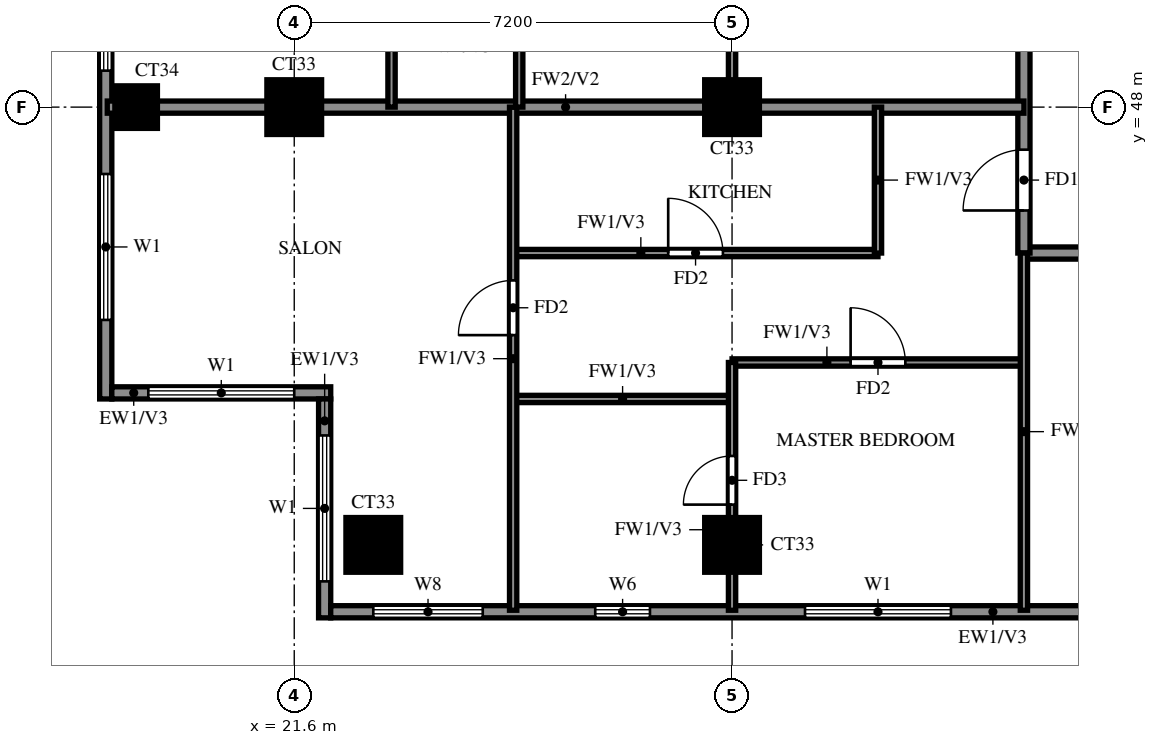
"""IFC4 building model, lengths in metres.
Left out: names, types, materials, properties, quantities, classifications, styles, units other than length and angle.
Written with IfcOpenShell. Run it as: python <this file> out.ifc"""

import sys

from ifc_helpers import new_model, si_unit, direction, frame, frame_2d, origin, origin_2d, place, context, subcontext, project, spatial, rectangle, extrude, source, transform, mapped, element, fill, save


model = new_model("IFC4")
c1 = context("Model", 3, precision=1e-05, world=origin(), true_north=direction((0.0, 1.0)))
c2 = subcontext(c1, "Body", "Model", "MODEL_VIEW")
j1 = project(units=[si_unit("LENGTHUNIT", "METRE"), si_unit("PLANEANGLEUNIT", "RADIAN")], contexts=[c1])
p1 = place(None, origin())
s1 = spatial("IfcSite", under=j1, at=p1, CompositionType="ELEMENT")
p2 = place(p1, origin())
s2 = spatial("IfcBuilding", under=s1, at=p2, CompositionType="ELEMENT")
p3 = place(p2, frame((0.0, 0.0, 215.0)))
s3 = spatial("IfcBuildingStorey", under=s2, at=p3, CompositionType="ELEMENT", Elevation=215.0)
m1 = source(origin(), c2, "Body", "SweptSolid", [
    extrude(rectangle(XDim=0.9, YDim=0.9, at=origin_2d()), origin(), (0.0, 0.0, 1.0), 3.22),
])
for number, where, z_axis, x_axis in (
    (1, (22.9, 40.8, 0.0), (0.0, 0.0, 1.0), (1.0, 0.0, 0.0)),
    (2, (28.8, 40.8, 0.0), (0.0, 0.0, 1.0), (1.0, 0.0, 0.0)),
):
    element("IfcColumn", number, at=place(p3, frame(where, z_axis=z_axis, x_axis=x_axis)), inside=s3, PredefinedType="COLUMN", context=c2, shape_type="MappedRepresentation", body=[
        mapped(m1, transform((0.0, 0.0, 0.0))),
    ])
m2 = source(origin(), c2, "Body", "SweptSolid", [
    extrude(rectangle(XDim=0.7, YDim=0.7, at=origin_2d()), origin(), (0.0, 0.0, 1.0), 3.22),
])
p4 = place(p3, frame((19.0, 48.0, 0.0), z_axis=(0.0, 0.0, 1.0), x_axis=(1.0, 0.0, 0.0)))
e3 = element("IfcColumn", 3, at=p4, inside=s3, PredefinedType="COLUMN", context=c2, shape_type="MappedRepresentation", body=[
    mapped(m2, transform((0.0, 0.0, 0.0))),
])
for number, where, z_axis, x_axis in (
    (4, (21.6, 48.0, 0.0), (0.0, 0.0, 1.0), (1.0, 0.0, 0.0)),
    (5, (28.8, 48.0, 0.0), (0.0, 0.0, 1.0), (1.0, 0.0, 0.0)),
):
    element("IfcColumn", number, at=place(p3, frame(where, z_axis=z_axis, x_axis=x_axis)), inside=s3, PredefinedType="COLUMN", context=c2, shape_type="MappedRepresentation", body=[
        mapped(m1, transform((0.0, 0.0, 0.0))),
    ])
p5 = place(p3, frame((18.5, 76.6, 0.0), z_axis=(0.0, 0.0, 1.0), x_axis=(0.0, -1.0, 0.0)))
e6 = element("IfcWall", 6, at=p5, inside=s3, PredefinedType="SOLIDWALL", context=c2, shape_type="SweptSolid", body=[
    extrude(rectangle(XDim=33.4, YDim=0.2, at=frame_2d((16.7, 0.0))), origin(), (0.0, 0.0, 1.0), 3.22),
])
p6 = place(p5, frame((29.7, 0.0, 0.6)))
e7 = element("IfcOpeningElement", 7, at=p6, cuts=e6, PredefinedType="OPENING", context=c2, shape_type="SweptSolid", body=[
    extrude(rectangle(XDim=2.4, YDim=2.4, at=frame_2d((1.2, 1.2))), frame((0.0, 0.11, 0.0), z_axis=(0.0, -1.0, 0.0), x_axis=(1.0, 0.0, 0.0)), (0.0, 0.0, 1.0), 0.22),
])
p7 = place(p5, frame((25.6, 0.0, 0.6)))
e8 = element("IfcOpeningElement", 8, at=p7, cuts=e6, PredefinedType="OPENING", context=c2, shape_type="SweptSolid", body=[
    extrude(rectangle(XDim=2.4, YDim=2.4, at=frame_2d((1.2, 1.2))), frame((0.0, 0.11, 0.0), z_axis=(0.0, -1.0, 0.0), x_axis=(1.0, 0.0, 0.0)), (0.0, 0.0, 1.0), 0.22),
])
p8 = place(p5, frame((22.0, 0.0, 0.6)))
e9 = element("IfcOpeningElement", 9, at=p8, cuts=e6, PredefinedType="OPENING", context=c2, shape_type="SweptSolid", body=[
    extrude(rectangle(XDim=2.4, YDim=2.4, at=frame_2d((1.2, 1.2))), frame((0.0, 0.11, 0.0), z_axis=(0.0, -1.0, 0.0), x_axis=(1.0, 0.0, 0.0)), (0.0, 0.0, 1.0), 0.22),
])
p9 = place(p5, frame((18.4, 0.0, 0.6)))
e10 = element("IfcOpeningElement", 10, at=p9, cuts=e6, PredefinedType="OPENING", context=c2, shape_type="SweptSolid", body=[
    extrude(rectangle(XDim=2.4, YDim=2.4, at=frame_2d((1.2, 1.2))), frame((0.0, 0.11, 0.0), z_axis=(0.0, -1.0, 0.0), x_axis=(1.0, 0.0, 0.0)), (0.0, 0.0, 1.0), 0.22),
])
p10 = place(p5, frame((14.8, 0.0, 0.6)))
e11 = element("IfcOpeningElement", 11, at=p10, cuts=e6, PredefinedType="OPENING", context=c2, shape_type="SweptSolid", body=[
    extrude(rectangle(XDim=2.4, YDim=2.4, at=frame_2d((1.2, 1.2))), frame((0.0, 0.11, 0.0), z_axis=(0.0, -1.0, 0.0), x_axis=(1.0, 0.0, 0.0)), (0.0, 0.0, 1.0), 0.22),
])
p11 = place(p5, frame((7.833, 0.0, 0.6)))
e12 = element("IfcOpeningElement", 12, at=p11, cuts=e6, PredefinedType="OPENING", context=c2, shape_type="SweptSolid", body=[
    extrude(rectangle(XDim=2.4, YDim=2.4, at=frame_2d((1.2, 1.2))), frame((0.0, 0.11, 0.0), z_axis=(0.0, -1.0, 0.0), x_axis=(1.0, 0.0, 0.0)), (0.0, 0.0, 1.0), 0.22),
])
p12 = place(p5, frame((10.967, 0.0, 0.6)))
e13 = element("IfcOpeningElement", 13, at=p12, cuts=e6, PredefinedType="OPENING", context=c2, shape_type="SweptSolid", body=[
    extrude(rectangle(XDim=2.4, YDim=2.4, at=frame_2d((1.2, 1.2))), frame((0.0, 0.11, 0.0), z_axis=(0.0, -1.0, 0.0), x_axis=(1.0, 0.0, 0.0)), (0.0, 0.0, 1.0), 0.22),
])
p13 = place(p5, frame((4.75, 0.0, 1.5)))
e14 = element("IfcOpeningElement", 14, at=p13, cuts=e6, PredefinedType="OPENING", context=c2, shape_type="SweptSolid", body=[
    extrude(rectangle(XDim=0.9, YDim=0.9, at=frame_2d((0.45, 0.45))), frame((0.0, 0.11, 0.0), z_axis=(0.0, -1.0, 0.0), x_axis=(1.0, 0.0, 0.0)), (0.0, 0.0, 1.0), 0.22),
])
p14 = place(p5, frame((0.6, 0.0, 0.6)))
e15 = element("IfcOpeningElement", 15, at=p14, cuts=e6, PredefinedType="OPENING", context=c2, shape_type="SweptSolid", body=[
    extrude(rectangle(XDim=2.4, YDim=2.4, at=frame_2d((1.2, 1.2))), frame((0.0, 0.11, 0.0), z_axis=(0.0, -1.0, 0.0), x_axis=(1.0, 0.0, 0.0)), (0.0, 0.0, 1.0), 0.22),
])
p15 = place(p3, frame((18.6, 43.3, 0.0), z_axis=(0.0, 0.0, 1.0), x_axis=(1.0, 0.0, 0.0)))
e16 = element("IfcWall", 16, at=p15, inside=s3, PredefinedType="SOLIDWALL", context=c2, shape_type="SweptSolid", body=[
    extrude(rectangle(XDim=3.6, YDim=0.2, at=frame_2d((1.8, 0.0))), origin(), (0.0, 0.0, 1.0), 3.22),
])
p16 = place(p15, frame((0.6, 0.0, 0.6)))
e17 = element("IfcOpeningElement", 17, at=p16, cuts=e16, PredefinedType="OPENING", context=c2, shape_type="SweptSolid", body=[
    extrude(rectangle(XDim=2.4, YDim=2.4, at=frame_2d((1.2, 1.2))), frame((0.0, 0.11, 0.0), z_axis=(0.0, -1.0, 0.0), x_axis=(1.0, 0.0, 0.0)), (0.0, 0.0, 1.0), 0.22),
])
p17 = place(p3, frame((22.1, 43.2, 0.0), z_axis=(0.0, 0.0, 1.0), x_axis=(0.0, -1.0, 0.0)))
e18 = element("IfcWall", 18, at=p17, inside=s3, PredefinedType="SOLIDWALL", context=c2, shape_type="SweptSolid", body=[
    extrude(rectangle(XDim=3.6, YDim=0.2, at=frame_2d((1.8, 0.0))), origin(), (0.0, 0.0, 1.0), 3.22),
])
p18 = place(p17, frame((0.6, 0.0, 0.6)))
e19 = element("IfcOpeningElement", 19, at=p18, cuts=e18, PredefinedType="OPENING", context=c2, shape_type="SweptSolid", body=[
    extrude(rectangle(XDim=2.4, YDim=2.4, at=frame_2d((1.2, 1.2))), frame((0.0, 0.11, 0.0), z_axis=(0.0, -1.0, 0.0), x_axis=(1.0, 0.0, 0.0)), (0.0, 0.0, 1.0), 0.22),
])
p19 = place(p3, frame((22.2, 39.7, 0.0), z_axis=(0.0, 0.0, 1.0), x_axis=(1.0, 0.0, 0.0)))
e20 = element("IfcWall", 20, at=p19, inside=s3, PredefinedType="SOLIDWALL", context=c2, shape_type="SweptSolid", body=[
    extrude(rectangle(XDim=19.8, YDim=0.2, at=frame_2d((9.9, 0.0))), origin(), (0.0, 0.0, 1.0), 3.22),
])
p20 = place(p19, frame((0.7, 0.0, 0.6)))
e21 = element("IfcOpeningElement", 21, at=p20, cuts=e20, PredefinedType="OPENING", context=c2, shape_type="SweptSolid", body=[
    extrude(rectangle(XDim=1.8, YDim=2.4, at=frame_2d((0.9, 1.2))), frame((0.0, 0.11, 0.0), z_axis=(0.0, -1.0, 0.0), x_axis=(1.0, 0.0, 0.0)), (0.0, 0.0, 1.0), 0.22),
])
p21 = place(p19, frame((7.8, 0.0, 0.6)))
e22 = element("IfcOpeningElement", 22, at=p21, cuts=e20, PredefinedType="OPENING", context=c2, shape_type="SweptSolid", body=[
    extrude(rectangle(XDim=2.4, YDim=2.4, at=frame_2d((1.2, 1.2))), frame((0.0, 0.11, 0.0), z_axis=(0.0, -1.0, 0.0), x_axis=(1.0, 0.0, 0.0)), (0.0, 0.0, 1.0), 0.22),
])
p22 = place(p19, frame((4.35, 0.0, 1.5)))
e23 = element("IfcOpeningElement", 23, at=p22, cuts=e20, PredefinedType="OPENING", context=c2, shape_type="SweptSolid", body=[
    extrude(rectangle(XDim=0.9, YDim=0.9, at=frame_2d((0.45, 0.45))), frame((0.0, 0.11, 0.0), z_axis=(0.0, -1.0, 0.0), x_axis=(1.0, 0.0, 0.0)), (0.0, 0.0, 1.0), 0.22),
])
p23 = place(p3, frame((33.6, 45.6, 0.0), z_axis=(0.0, 0.0, 1.0), x_axis=(1.0, 0.0, 0.0)))
e24 = element("IfcWall", 24, at=p23, inside=s3, PredefinedType="SOLIDWALL", context=c2, shape_type="SweptSolid", body=[
    extrude(rectangle(XDim=7.2, YDim=0.2, at=frame_2d((3.6, 0.0))), origin(), (0.0, 0.0, 1.0), 3.22),
])
p24 = place(p23, frame((3.15, 0.0, 0.0)))
e25 = element("IfcOpeningElement", 25, at=p24, cuts=e24, PredefinedType="OPENING", context=c2, shape_type="SweptSolid", body=[
    extrude(rectangle(XDim=0.9, YDim=2.1, at=frame_2d((0.45, 1.05))), frame((0.0, 0.11, 0.0), z_axis=(0.0, -1.0, 0.0), x_axis=(1.0, 0.0, 0.0)), (0.0, 0.0, 1.0), 0.22),
])
p25 = place(p3, frame((33.6, 45.6, 0.0), z_axis=(0.0, 0.0, 1.0), x_axis=(0.0, 1.0, 0.0)))
e26 = element("IfcWall", 26, at=p25, inside=s3, PredefinedType="SOLIDWALL", context=c2, shape_type="SweptSolid", body=[
    extrude(rectangle(XDim=8.4, YDim=0.2, at=frame_2d((4.2, 0.0))), origin(), (0.0, 0.0, 1.0), 3.22),
])
p26 = place(p25, frame((0.7, 0.0, 0.0)))
e27 = element("IfcOpeningElement", 27, at=p26, cuts=e26, PredefinedType="OPENING", context=c2, shape_type="SweptSolid", body=[
    extrude(rectangle(XDim=1.0, YDim=2.1, at=frame_2d((0.5, 1.05))), frame((0.0, 0.11, 0.0), z_axis=(0.0, -1.0, 0.0), x_axis=(1.0, 0.0, 0.0)), (0.0, 0.0, 1.0), 0.22),
])
p27 = place(p25, frame((6.7, 0.0, 0.0)))
e28 = element("IfcOpeningElement", 28, at=p27, cuts=e26, PredefinedType="OPENING", context=c2, shape_type="SweptSolid", body=[
    extrude(rectangle(XDim=1.0, YDim=2.1, at=frame_2d((0.5, 1.05))), frame((0.0, 0.11, 0.0), z_axis=(0.0, -1.0, 0.0), x_axis=(1.0, 0.0, 0.0)), (0.0, 0.0, 1.0), 0.22),
])
p28 = place(p3, frame((18.525, 48.0, 0.0), z_axis=(0.0, 0.0, 1.0), x_axis=(1.0, 0.0, 0.0)))
e29 = element("IfcWall", 29, at=p28, inside=s3, PredefinedType="SOLIDWALL", context=c2, shape_type="SweptSolid", body=[
    extrude(rectangle(XDim=15.075, YDim=0.2, at=frame_2d((7.538, 0.0))), origin(), (0.0, 0.0, 1.0), 3.22),
])
p29 = place(p3, frame((25.2, 43.2, 0.0), z_axis=(0.0, 0.0, 1.0), x_axis=(1.0, 0.0, 0.0)))
e30 = element("IfcWall", 30, at=p29, inside=s3, PredefinedType="PARTITIONING", context=c2, shape_type="SweptSolid", body=[
    extrude(rectangle(XDim=3.6, YDim=0.12, at=frame_2d((1.8, 0.0))), origin(), (0.0, 0.0, 1.0), 3.22),
])
p30 = place(p3, frame((28.8, 43.8, 0.0), z_axis=(0.0, 0.0, 1.0), x_axis=(1.0, 0.0, 0.0)))
e31 = element("IfcWall", 31, at=p30, inside=s3, PredefinedType="PARTITIONING", context=c2, shape_type="SweptSolid", body=[
    extrude(rectangle(XDim=4.8, YDim=0.12, at=frame_2d((2.4, 0.0))), origin(), (0.0, 0.0, 1.0), 3.22),
])
p31 = place(p30, frame((1.95, 0.0, 0.0)))
e32 = element("IfcOpeningElement", 32, at=p31, cuts=e31, PredefinedType="OPENING", context=c2, shape_type="SweptSolid", body=[
    extrude(rectangle(XDim=0.9, YDim=2.1, at=frame_2d((0.45, 1.05))), frame((0.0, 0.07, 0.0), z_axis=(0.0, -1.0, 0.0), x_axis=(1.0, 0.0, 0.0)), (0.0, 0.0, 1.0), 0.14),
])
p32 = place(p3, frame((25.2, 45.6, 0.0), z_axis=(0.0, 0.0, 1.0), x_axis=(1.0, 0.0, 0.0)))
e33 = element("IfcWall", 33, at=p32, inside=s3, PredefinedType="PARTITIONING", context=c2, shape_type="SweptSolid", body=[
    extrude(rectangle(XDim=6.0, YDim=0.12, at=frame_2d((3.0, 0.0))), origin(), (0.0, 0.0, 1.0), 3.22),
])
p33 = place(p32, frame((2.55, 0.0, 0.0)))
e34 = element("IfcOpeningElement", 34, at=p33, cuts=e33, PredefinedType="OPENING", context=c2, shape_type="SweptSolid", body=[
    extrude(rectangle(XDim=0.9, YDim=2.1, at=frame_2d((0.45, 1.05))), frame((0.0, 0.07, 0.0), z_axis=(0.0, -1.0, 0.0), x_axis=(1.0, 0.0, 0.0)), (0.0, 0.0, 1.0), 0.14),
])
p34 = place(p3, frame((23.2, 48.0, 0.0), z_axis=(0.0, 0.0, 1.0), x_axis=(0.0, 1.0, 0.0)))
e35 = element("IfcWall", 35, at=p34, inside=s3, PredefinedType="PARTITIONING", context=c2, shape_type="SweptSolid", body=[
    extrude(rectangle(XDim=21.6, YDim=0.12, at=frame_2d((10.8, 0.0))), origin(), (0.0, 0.0, 1.0), 3.22),
])
p35 = place(p34, frame((1.35, 0.0, 0.0)))
e36 = element("IfcOpeningElement", 36, at=p35, cuts=e35, PredefinedType="OPENING", context=c2, shape_type="SweptSolid", body=[
    extrude(rectangle(XDim=0.9, YDim=2.1, at=frame_2d((0.45, 1.05))), frame((0.0, 0.07, 0.0), z_axis=(0.0, -1.0, 0.0), x_axis=(1.0, 0.0, 0.0)), (0.0, 0.0, 1.0), 0.14),
])
p36 = place(p34, frame((4.95, 0.0, 0.0)))
e37 = element("IfcOpeningElement", 37, at=p36, cuts=e35, PredefinedType="OPENING", context=c2, shape_type="SweptSolid", body=[
    extrude(rectangle(XDim=0.9, YDim=2.1, at=frame_2d((0.45, 1.05))), frame((0.0, 0.07, 0.0), z_axis=(0.0, -1.0, 0.0), x_axis=(1.0, 0.0, 0.0)), (0.0, 0.0, 1.0), 0.14),
])
p37 = place(p34, frame((8.25, 0.0, 0.0)))
e38 = element("IfcOpeningElement", 38, at=p37, cuts=e35, PredefinedType="OPENING", context=c2, shape_type="SweptSolid", body=[
    extrude(rectangle(XDim=1.5, YDim=2.1, at=frame_2d((0.75, 1.05))), frame((0.0, 0.07, 0.0), z_axis=(0.0, -1.0, 0.0), x_axis=(1.0, 0.0, 0.0)), (0.0, 0.0, 1.0), 0.14),
])
p38 = place(p34, frame((12.15, 0.0, 0.0)))
e39 = element("IfcOpeningElement", 39, at=p38, cuts=e35, PredefinedType="OPENING", context=c2, shape_type="SweptSolid", body=[
    extrude(rectangle(XDim=0.9, YDim=2.1, at=frame_2d((0.45, 1.05))), frame((0.0, 0.07, 0.0), z_axis=(0.0, -1.0, 0.0), x_axis=(1.0, 0.0, 0.0)), (0.0, 0.0, 1.0), 0.14),
])
p39 = place(p34, frame((17.55, 0.0, 0.0)))
e40 = element("IfcOpeningElement", 40, at=p39, cuts=e35, PredefinedType="OPENING", context=c2, shape_type="SweptSolid", body=[
    extrude(rectangle(XDim=0.9, YDim=2.1, at=frame_2d((0.45, 1.05))), frame((0.0, 0.07, 0.0), z_axis=(0.0, -1.0, 0.0), x_axis=(1.0, 0.0, 0.0)), (0.0, 0.0, 1.0), 0.14),
])
p40 = place(p3, frame((25.2, 39.725, 0.0), z_axis=(0.0, 0.0, 1.0), x_axis=(0.0, 1.0, 0.0)))
e41 = element("IfcWall", 41, at=p40, inside=s3, PredefinedType="PARTITIONING", context=c2, shape_type="SweptSolid", body=[
    extrude(rectangle(XDim=8.275, YDim=0.12, at=frame_2d((4.137, 0.0))), origin(), (0.0, 0.0, 1.0), 3.22),
])
p41 = place(p40, frame((4.525, 0.0, 0.0)))
e42 = element("IfcOpeningElement", 42, at=p41, cuts=e41, PredefinedType="OPENING", context=c2, shape_type="SweptSolid", body=[
    extrude(rectangle(XDim=0.9, YDim=2.1, at=frame_2d((0.45, 1.05))), frame((0.0, 0.07, 0.0), z_axis=(0.0, -1.0, 0.0), x_axis=(1.0, 0.0, 0.0)), (0.0, 0.0, 1.0), 0.14),
])
p42 = place(p3, frame((25.3, 48.0, 0.0), z_axis=(0.0, 0.0, 1.0), x_axis=(0.0, 1.0, 0.0)))
e43 = element("IfcWall", 43, at=p42, inside=s3, PredefinedType="PARTITIONING", context=c2, shape_type="SweptSolid", body=[
    extrude(rectangle(XDim=3.6, YDim=0.12, at=frame_2d((1.8, 0.0))), origin(), (0.0, 0.0, 1.0), 3.22),
])
p43 = place(p42, frame((1.35, 0.0, 0.0)))
e44 = element("IfcOpeningElement", 44, at=p43, cuts=e43, PredefinedType="OPENING", context=c2, shape_type="SweptSolid", body=[
    extrude(rectangle(XDim=0.9, YDim=2.1, at=frame_2d((0.45, 1.05))), frame((0.0, 0.07, 0.0), z_axis=(0.0, -1.0, 0.0), x_axis=(1.0, 0.0, 0.0)), (0.0, 0.0, 1.0), 0.14),
])
p44 = place(p3, frame((28.8, 39.725, 0.0), z_axis=(0.0, 0.0, 1.0), x_axis=(0.0, 1.0, 0.0)))
e45 = element("IfcWall", 45, at=p44, inside=s3, PredefinedType="PARTITIONING", context=c2, shape_type="SweptSolid", body=[
    extrude(rectangle(XDim=4.075, YDim=0.12, at=frame_2d((2.038, 0.0))), origin(), (0.0, 0.0, 1.0), 3.22),
])
p45 = place(p44, frame((1.738, 0.0, 0.0)))
e46 = element("IfcOpeningElement", 46, at=p45, cuts=e45, PredefinedType="OPENING", context=c2, shape_type="SweptSolid", body=[
    extrude(rectangle(XDim=0.8, YDim=2.1, at=frame_2d((0.4, 1.05))), frame((0.0, 0.07, 0.0), z_axis=(0.0, -1.0, 0.0), x_axis=(1.0, 0.0, 0.0)), (0.0, 0.0, 1.0), 0.14),
])
p46 = place(p3, frame((28.8, 48.0, 0.0), z_axis=(0.0, 0.0, 1.0), x_axis=(0.0, 1.0, 0.0)))
e47 = element("IfcWall", 47, at=p46, inside=s3, PredefinedType="PARTITIONING", context=c2, shape_type="SweptSolid", body=[
    extrude(rectangle(XDim=3.6, YDim=0.12, at=frame_2d((1.8, 0.0))), origin(), (0.0, 0.0, 1.0), 3.22),
])
p47 = place(p3, frame((31.2, 45.6, 0.0), z_axis=(0.0, 0.0, 1.0), x_axis=(0.0, 1.0, 0.0)))
e48 = element("IfcWall", 48, at=p47, inside=s3, PredefinedType="PARTITIONING", context=c2, shape_type="SweptSolid", body=[
    extrude(rectangle(XDim=2.4, YDim=0.12, at=frame_2d((1.2, 0.0))), origin(), (0.0, 0.0, 1.0), 3.22),
])
p48 = place(p3, frame((33.6, 39.725, 0.0), z_axis=(0.0, 0.0, 1.0), x_axis=(0.0, 1.0, 0.0)))
e49 = element("IfcWall", 49, at=p48, inside=s3, PredefinedType="PARTITIONING", context=c2, shape_type="SweptSolid", body=[
    extrude(rectangle(XDim=5.875, YDim=0.12, at=frame_2d((2.938, 0.0))), origin(), (0.0, 0.0, 1.0), 3.22),
])
p49 = place(p6, origin())
e50 = element("IfcWindow", 50, at=p49, inside=s3, PartitioningType="DOUBLE_PANEL_VERTICAL", PredefinedType="WINDOW", context=c2, shape_type="SweptSolid", body=[
    extrude(rectangle(XDim=2.4, YDim=2.4, at=frame_2d((1.2, 1.2))), frame((0.0, 0.03, 0.0), z_axis=(0.0, -1.0, 0.0), x_axis=(1.0, 0.0, 0.0)), (0.0, 0.0, 1.0), 0.06),
])
fill(e7, e50)
p50 = place(p7, origin())
e51 = element("IfcWindow", 51, at=p50, inside=s3, PartitioningType="DOUBLE_PANEL_VERTICAL", PredefinedType="WINDOW", context=c2, shape_type="SweptSolid", body=[
    extrude(rectangle(XDim=2.4, YDim=2.4, at=frame_2d((1.2, 1.2))), frame((0.0, 0.03, 0.0), z_axis=(0.0, -1.0, 0.0), x_axis=(1.0, 0.0, 0.0)), (0.0, 0.0, 1.0), 0.06),
])
fill(e8, e51)
p51 = place(p16, origin())
e52 = element("IfcWindow", 52, at=p51, inside=s3, PartitioningType="DOUBLE_PANEL_VERTICAL", PredefinedType="WINDOW", context=c2, shape_type="SweptSolid", body=[
    extrude(rectangle(XDim=2.4, YDim=2.4, at=frame_2d((1.2, 1.2))), frame((0.0, 0.03, 0.0), z_axis=(0.0, -1.0, 0.0), x_axis=(1.0, 0.0, 0.0)), (0.0, 0.0, 1.0), 0.06),
])
fill(e17, e52)
p52 = place(p18, origin())
e53 = element("IfcWindow", 53, at=p52, inside=s3, PartitioningType="DOUBLE_PANEL_VERTICAL", PredefinedType="WINDOW", context=c2, shape_type="SweptSolid", body=[
    extrude(rectangle(XDim=2.4, YDim=2.4, at=frame_2d((1.2, 1.2))), frame((0.0, 0.03, 0.0), z_axis=(0.0, -1.0, 0.0), x_axis=(1.0, 0.0, 0.0)), (0.0, 0.0, 1.0), 0.06),
])
fill(e19, e53)
p53 = place(p20, origin())
e54 = element("IfcWindow", 54, at=p53, inside=s3, PartitioningType="DOUBLE_PANEL_VERTICAL", PredefinedType="WINDOW", context=c2, shape_type="SweptSolid", body=[
    extrude(rectangle(XDim=1.8, YDim=2.4, at=frame_2d((0.9, 1.2))), frame((0.0, 0.03, 0.0), z_axis=(0.0, -1.0, 0.0), x_axis=(1.0, 0.0, 0.0)), (0.0, 0.0, 1.0), 0.06),
])
fill(e21, e54)
p54 = place(p21, origin())
e55 = element("IfcWindow", 55, at=p54, inside=s3, PartitioningType="DOUBLE_PANEL_VERTICAL", PredefinedType="WINDOW", context=c2, shape_type="SweptSolid", body=[
    extrude(rectangle(XDim=2.4, YDim=2.4, at=frame_2d((1.2, 1.2))), frame((0.0, 0.03, 0.0), z_axis=(0.0, -1.0, 0.0), x_axis=(1.0, 0.0, 0.0)), (0.0, 0.0, 1.0), 0.06),
])
fill(e22, e55)
p55 = place(p22, origin())
e56 = element("IfcWindow", 56, at=p55, inside=s3, PartitioningType="SINGLE_PANEL", PredefinedType="WINDOW", context=c2, shape_type="SweptSolid", body=[
    extrude(rectangle(XDim=0.9, YDim=0.9, at=frame_2d((0.45, 0.45))), frame((0.0, 0.03, 0.0), z_axis=(0.0, -1.0, 0.0), x_axis=(1.0, 0.0, 0.0)), (0.0, 0.0, 1.0), 0.06),
])
fill(e23, e56)
p56 = place(p26, origin())
e57 = element("IfcDoor", 57, at=p56, inside=s3, OperationType="SINGLE_SWING_RIGHT", PredefinedType="DOOR", context=c2, shape_type="SweptSolid", body=[
    extrude(rectangle(XDim=1.0, YDim=2.1, at=frame_2d((0.5, 1.05))), frame((0.0, 0.025, 0.0), z_axis=(0.0, -1.0, 0.0), x_axis=(1.0, 0.0, 0.0)), (0.0, 0.0, 1.0), 0.05),
])
fill(e27, e57)
p57 = place(p41, origin())
e58 = element("IfcDoor", 58, at=p57, inside=s3, OperationType="SINGLE_SWING_LEFT", PredefinedType="DOOR", context=c2, shape_type="SweptSolid", body=[
    extrude(rectangle(XDim=0.9, YDim=2.1, at=frame_2d((0.45, 1.05))), frame((0.0, 0.025, 0.0), z_axis=(0.0, -1.0, 0.0), x_axis=(1.0, 0.0, 0.0)), (0.0, 0.0, 1.0), 0.05),
])
fill(e42, e58)
p58 = place(p31, origin())
e59 = element("IfcDoor", 59, at=p58, inside=s3, OperationType="SINGLE_SWING_LEFT", PredefinedType="DOOR", context=c2, shape_type="SweptSolid", body=[
    extrude(rectangle(XDim=0.9, YDim=2.1, at=frame_2d((0.45, 1.05))), frame((0.0, 0.025, 0.0), z_axis=(0.0, -1.0, 0.0), x_axis=(1.0, 0.0, 0.0)), (0.0, 0.0, 1.0), 0.05),
])
fill(e32, e59)
p59 = place(p45, origin())
e60 = element("IfcDoor", 60, at=p59, inside=s3, OperationType="SINGLE_SWING_LEFT", PredefinedType="DOOR", context=c2, shape_type="SweptSolid", body=[
    extrude(rectangle(XDim=0.8, YDim=2.1, at=frame_2d((0.4, 1.05))), frame((0.0, 0.025, 0.0), z_axis=(0.0, -1.0, 0.0), x_axis=(1.0, 0.0, 0.0)), (0.0, 0.0, 1.0), 0.05),
])
fill(e46, e60)
p60 = place(p33, origin())
e61 = element("IfcDoor", 61, at=p60, inside=s3, OperationType="SINGLE_SWING_LEFT", PredefinedType="DOOR", context=c2, shape_type="SweptSolid", body=[
    extrude(rectangle(XDim=0.9, YDim=2.1, at=frame_2d((0.45, 1.05))), frame((0.0, 0.025, 0.0), z_axis=(0.0, -1.0, 0.0), x_axis=(1.0, 0.0, 0.0)), (0.0, 0.0, 1.0), 0.05),
])
fill(e34, e61)
save(model, sys.argv[1])
